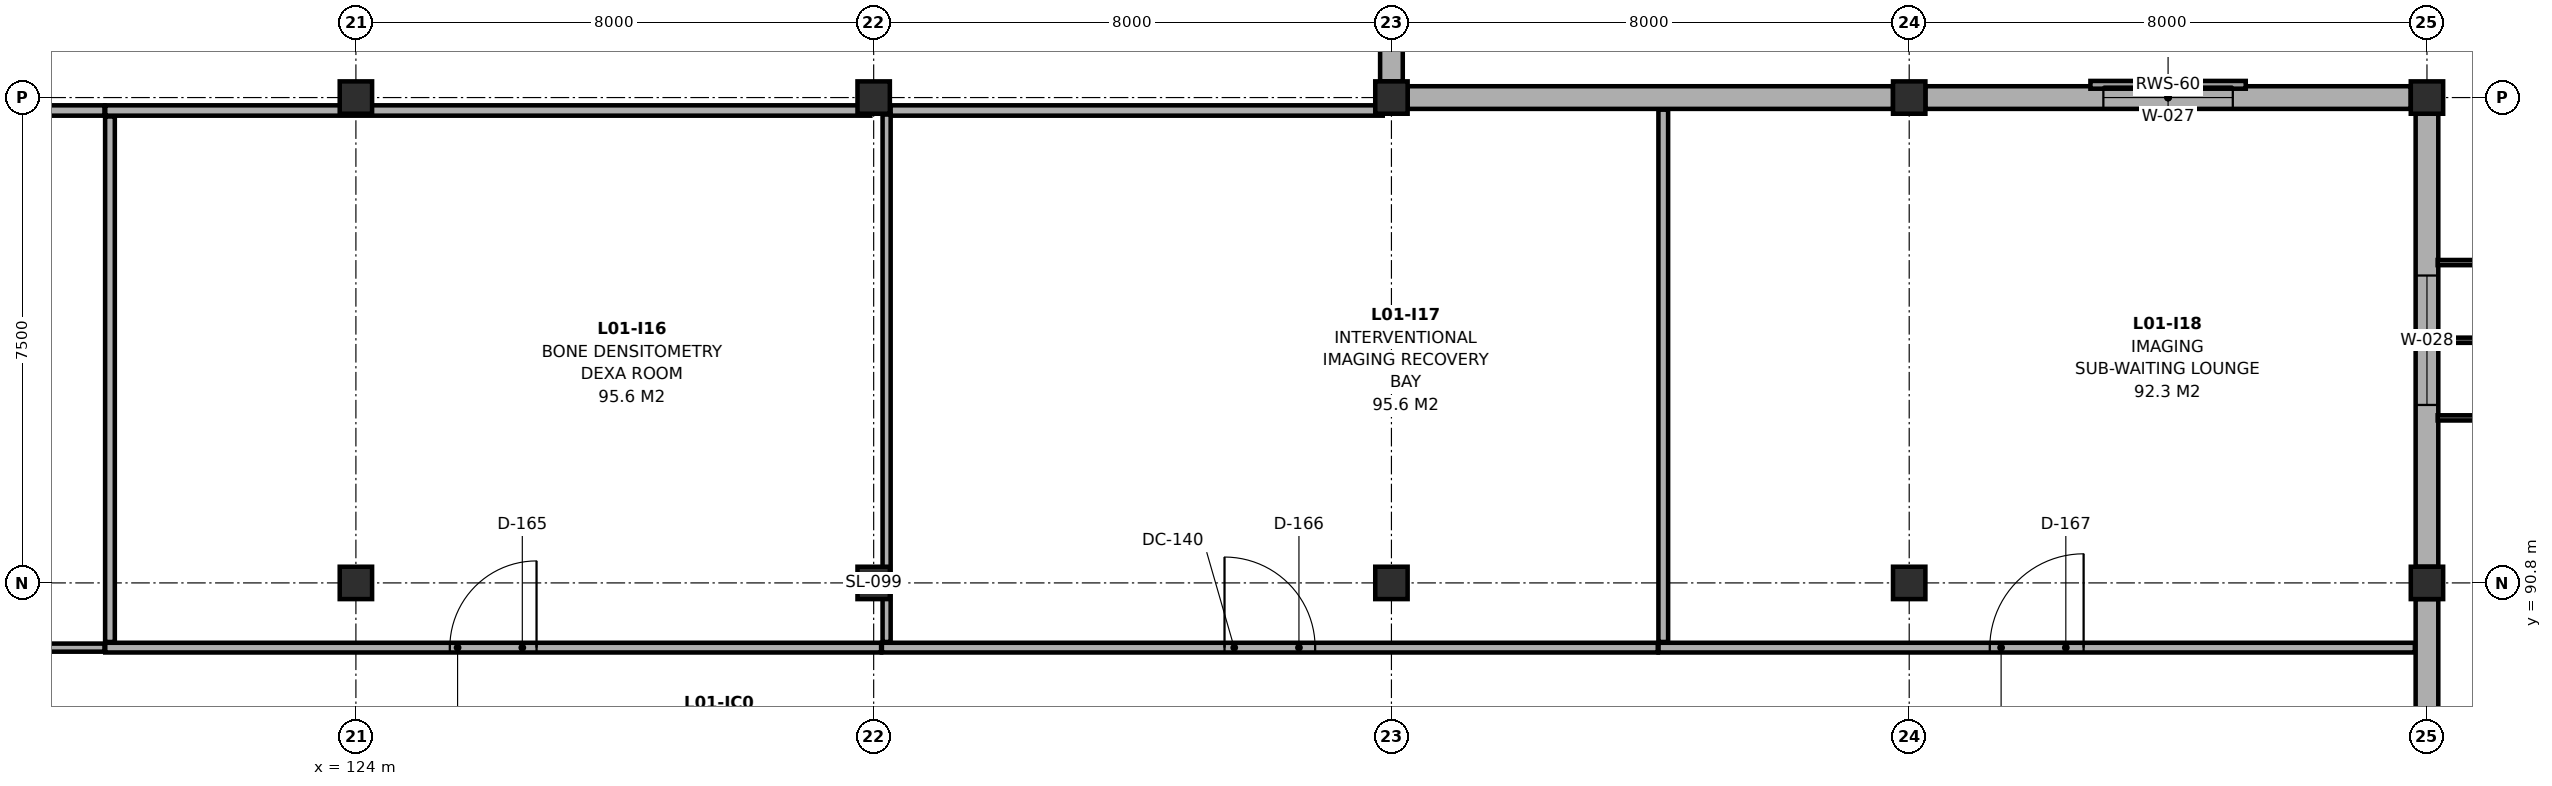
"""IFC4 building model, lengths in metres.
Left out: names, types, materials, properties, quantities, classifications, styles, units other than length and angle.
Written with IfcOpenShell. Run it as: python <this file> out.ifc"""

import sys

from ifc_helpers import new_model, si_unit, direction, frame, frame_2d, origin, origin_2d, place, context, subcontext, project, spatial, rectangle, extrude, element, fill, save


model = new_model("IFC4")
c1 = context("Model", 3, precision=1e-05, world=origin(), true_north=direction((0.0, 1.0)))
c2 = subcontext(c1, "Body", "Model", "MODEL_VIEW")
j1 = project(units=[si_unit("LENGTHUNIT", "METRE"), si_unit("PLANEANGLEUNIT", "RADIAN")], contexts=[c1])
p1 = place(None, origin())
s1 = spatial("IfcSite", under=j1, at=p1, CompositionType="ELEMENT")
p2 = place(p1, origin())
s2 = spatial("IfcBuilding", under=s1, at=p2, CompositionType="ELEMENT")
p3 = place(p2, frame((0.0, 0.0, 5.0)))
s3 = spatial("IfcBuildingStorey", under=s2, at=p3, CompositionType="ELEMENT", Elevation=5.0)
for number, where, z_axis, x_axis in (
    (1, (124.0, 90.8, 0.0), (0.0, 0.0, 1.0), (1.0, 0.0, 0.0)),
    (2, (124.0, 98.3, 0.0), (0.0, 0.0, 1.0), (1.0, 0.0, 0.0)),
    (3, (132.0, 90.8, 0.0), (0.0, 0.0, 1.0), (1.0, 0.0, 0.0)),
    (4, (132.0, 98.3, 0.0), (0.0, 0.0, 1.0), (1.0, 0.0, 0.0)),
    (5, (140.0, 90.8, 0.0), (0.0, 0.0, 1.0), (1.0, 0.0, 0.0)),
    (6, (140.0, 98.3, 0.0), (0.0, 0.0, 1.0), (1.0, 0.0, 0.0)),
    (7, (148.0, 90.8, 0.0), (0.0, 0.0, 1.0), (1.0, 0.0, 0.0)),
    (8, (148.0, 98.3, 0.0), (0.0, 0.0, 1.0), (1.0, 0.0, 0.0)),
    (9, (156.0, 90.8, 0.0), (0.0, 0.0, 1.0), (1.0, 0.0, 0.0)),
    (10, (156.0, 98.3, 0.0), (0.0, 0.0, 1.0), (1.0, 0.0, 0.0)),
):
    element("IfcColumn", number, at=place(p3, frame(where, z_axis=z_axis, x_axis=x_axis)), inside=s3, PredefinedType="COLUMN", context=c2, shape_type="SweptSolid", body=[
        extrude(rectangle(XDim=0.5, YDim=0.5, at=origin_2d()), origin(), (0.0, 0.0, 1.0), 5.5),
    ])
p4 = place(p3, frame((140.0, 105.55, 0.0), z_axis=(0.0, 0.0, 1.0), x_axis=(0.0, -1.0, 0.0)))
e11 = element("IfcWall", 11, at=p4, inside=s3, PredefinedType="SOLIDWALL", context=c2, shape_type="SweptSolid", body=[
    extrude(rectangle(XDim=7.0, YDim=0.35, at=frame_2d((3.5, 0.0))), origin(), (0.0, 0.0, 1.0), 3.655),
])
p5 = place(p4, frame((2.5, 0.0, 0.9)))
e12 = element("IfcOpeningElement", 12, at=p5, cuts=e11, PredefinedType="OPENING", context=c2, shape_type="SweptSolid", body=[
    extrude(rectangle(XDim=2.0, YDim=1.5, at=frame_2d((1.0, 0.75))), frame((0.0, 0.187, 0.0), z_axis=(0.0, -1.0, 0.0), x_axis=(1.0, 0.0, 0.0)), (0.0, 0.0, 1.0), 0.374),
])
p6 = place(p3, frame((140.25, 98.3, 0.0), z_axis=(0.0, 0.0, 1.0), x_axis=(1.0, 0.0, 0.0)))
e13 = element("IfcWall", 13, at=p6, inside=s3, PredefinedType="SOLIDWALL", context=c2, shape_type="SweptSolid", body=[
    extrude(rectangle(XDim=7.5, YDim=0.35, at=frame_2d((3.75, 0.0))), origin(), (0.0, 0.0, 1.0), 3.655),
])
p7 = place(p3, frame((148.25, 98.3, 0.0), z_axis=(0.0, 0.0, 1.0), x_axis=(1.0, 0.0, 0.0)))
e14 = element("IfcWall", 14, at=p7, inside=s3, PredefinedType="SOLIDWALL", context=c2, shape_type="SweptSolid", body=[
    extrude(rectangle(XDim=7.5, YDim=0.35, at=frame_2d((3.75, 0.0))), origin(), (0.0, 0.0, 1.0), 4.2),
])
p8 = place(p7, frame((2.75, 0.0, 0.9)))
e15 = element("IfcOpeningElement", 15, at=p8, cuts=e14, PredefinedType="OPENING", context=c2, shape_type="SweptSolid", body=[
    extrude(rectangle(XDim=2.0, YDim=1.7, at=frame_2d((1.0, 0.85))), frame((0.0, 0.187, 0.0), z_axis=(0.0, -1.0, 0.0), x_axis=(1.0, 0.0, 0.0)), (0.0, 0.0, 1.0), 0.374),
])
p9 = place(p3, frame((156.0, 98.05, 0.0), z_axis=(0.0, 0.0, 1.0), x_axis=(0.0, -1.0, 0.0)))
e16 = element("IfcWall", 16, at=p9, inside=s3, PredefinedType="SOLIDWALL", context=c2, shape_type="SweptSolid", body=[
    extrude(rectangle(XDim=7.0, YDim=0.35, at=frame_2d((3.5, 0.0))), origin(), (0.0, 0.0, 1.0), 4.2),
])
p10 = place(p9, frame((2.5, 0.0, 0.9)))
e17 = element("IfcOpeningElement", 17, at=p10, cuts=e16, PredefinedType="OPENING", context=c2, shape_type="SweptSolid", body=[
    extrude(rectangle(XDim=2.0, YDim=1.9, at=frame_2d((1.0, 0.95))), frame((0.0, 0.187, 0.0), z_axis=(0.0, -1.0, 0.0), x_axis=(1.0, 0.0, 0.0)), (0.0, 0.0, 1.0), 0.374),
])
p11 = place(p3, frame((156.0, 90.55, 0.0), z_axis=(0.0, 0.0, 1.0), x_axis=(0.0, -1.0, 0.0)))
e18 = element("IfcWall", 18, at=p11, inside=s3, PredefinedType="SOLIDWALL", context=c2, shape_type="SweptSolid", body=[
    extrude(rectangle(XDim=7.0, YDim=0.35, at=frame_2d((3.5, 0.0))), origin(), (0.0, 0.0, 1.0), 4.2),
])
p12 = place(p3, frame((108.187, 89.8, 0.0), z_axis=(0.0, 0.0, 1.0), x_axis=(1.0, 0.0, 0.0)))
e19 = element("IfcWall", 19, at=p12, inside=s3, PredefinedType="PARTITIONING", context=c2, shape_type="SweptSolid", body=[
    extrude(rectangle(XDim=11.928, YDim=0.125, at=frame_2d((5.964, 0.0))), origin(), (0.0, 0.0, 1.0), 4.2),
])
p13 = place(p12, frame((5.324, 0.0, 0.0)))
e20 = element("IfcOpeningElement", 20, at=p13, cuts=e19, PredefinedType="OPENING", context=c2, shape_type="SweptSolid", body=[
    extrude(rectangle(XDim=1.28, YDim=2.22, at=frame_2d((0.64, 1.11))), frame((0.0, 0.074, 0.0), z_axis=(0.0, -1.0, 0.0), x_axis=(1.0, 0.0, 0.0)), (0.0, 0.0, 1.0), 0.149),
])
p14 = place(p3, frame((120.127, 89.8, 0.0), z_axis=(0.0, 0.0, 1.0), x_axis=(1.0, 0.0, 0.0)))
e21 = element("IfcWall", 21, at=p14, inside=s3, PredefinedType="PARTITIONING", context=c2, shape_type="SweptSolid", body=[
    extrude(rectangle(XDim=11.988, YDim=0.15, at=frame_2d((5.994, 0.0))), origin(), (0.0, 0.0, 1.0), 4.2),
])
p15 = place(p14, frame((5.324, 0.0, 0.0)))
e22 = element("IfcOpeningElement", 22, at=p15, cuts=e21, PredefinedType="OPENING", context=c2, shape_type="SweptSolid", body=[
    extrude(rectangle(XDim=1.34, YDim=2.24, at=frame_2d((0.67, 1.12))), frame((0.0, 0.087, 0.0), z_axis=(0.0, -1.0, 0.0), x_axis=(1.0, 0.0, 0.0)), (0.0, 0.0, 1.0), 0.174),
])
p16 = place(p3, frame((132.127, 89.8, 0.0), z_axis=(0.0, 0.0, 1.0), x_axis=(1.0, 0.0, 0.0)))
e23 = element("IfcWall", 23, at=p16, inside=s3, PredefinedType="PARTITIONING", context=c2, shape_type="SweptSolid", body=[
    extrude(rectangle(XDim=11.988, YDim=0.15, at=frame_2d((5.994, 0.0))), origin(), (0.0, 0.0, 1.0), 4.2),
])
p17 = place(p16, frame((5.294, 0.0, 0.0)))
e24 = element("IfcOpeningElement", 24, at=p17, cuts=e23, PredefinedType="OPENING", context=c2, shape_type="SweptSolid", body=[
    extrude(rectangle(XDim=1.4, YDim=2.25, at=frame_2d((0.7, 1.125))), frame((0.0, 0.087, 0.0), z_axis=(0.0, -1.0, 0.0), x_axis=(1.0, 0.0, 0.0)), (0.0, 0.0, 1.0), 0.174),
])
p18 = place(p3, frame((144.127, 89.8, 0.0), z_axis=(0.0, 0.0, 1.0), x_axis=(1.0, 0.0, 0.0)))
e25 = element("IfcWall", 25, at=p18, inside=s3, PredefinedType="PARTITIONING", context=c2, shape_type="SweptSolid", body=[
    extrude(rectangle(XDim=11.686, YDim=0.15, at=frame_2d((5.843, 0.0))), origin(), (0.0, 0.0, 1.0), 4.2),
])
p19 = place(p18, frame((5.118, 0.0, 0.0)))
e26 = element("IfcOpeningElement", 26, at=p19, cuts=e25, PredefinedType="OPENING", context=c2, shape_type="SweptSolid", body=[
    extrude(rectangle(XDim=1.45, YDim=2.26, at=frame_2d((0.725, 1.13))), frame((0.0, 0.087, 0.0), z_axis=(0.0, -1.0, 0.0), x_axis=(1.0, 0.0, 0.0)), (0.0, 0.0, 1.0), 0.174),
])
p20 = place(p3, frame((108.262, 98.1, 0.0), z_axis=(0.0, 0.0, 1.0), x_axis=(1.0, 0.0, 0.0)))
e27 = element("IfcWall", 27, at=p20, inside=s3, PredefinedType="PARTITIONING", context=c2, shape_type="SweptSolid", body=[
    extrude(rectangle(XDim=11.853, YDim=0.16, at=frame_2d((5.927, 0.0))), origin(), (0.0, 0.0, 1.0), 4.2),
])
p21 = place(p3, frame((120.127, 98.1, 0.0), z_axis=(0.0, 0.0, 1.0), x_axis=(1.0, 0.0, 0.0)))
e28 = element("IfcWall", 28, at=p21, inside=s3, PredefinedType="PARTITIONING", context=c2, shape_type="SweptSolid", body=[
    extrude(rectangle(XDim=11.821, YDim=0.16, at=frame_2d((5.911, 0.0))), origin(), (0.0, 0.0, 1.0), 3.655),
])
p22 = place(p3, frame((132.262, 98.1, 0.0), z_axis=(0.0, 0.0, 1.0), x_axis=(1.0, 0.0, 0.0)))
e29 = element("IfcWall", 29, at=p22, inside=s3, PredefinedType="PARTITIONING", context=c2, shape_type="SweptSolid", body=[
    extrude(rectangle(XDim=7.604, YDim=0.16, at=frame_2d((3.802, 0.0))), origin(), (0.0, 0.0, 1.0), 3.655),
])
p23 = place(p3, frame((120.2, 89.887, 0.0), z_axis=(0.0, 0.0, 1.0), x_axis=(0.0, 1.0, 0.0)))
e30 = element("IfcWall", 30, at=p23, inside=s3, PredefinedType="PARTITIONING", context=c2, shape_type="SweptSolid", body=[
    extrude(rectangle(XDim=8.121, YDim=0.15, at=frame_2d((4.061, 0.0))), origin(), (0.0, 0.0, 1.0), 4.2),
])
p24 = place(p3, frame((132.2, 89.887, 0.0), z_axis=(0.0, 0.0, 1.0), x_axis=(0.0, 1.0, 0.0)))
e31 = element("IfcWall", 31, at=p24, inside=s3, PredefinedType="PARTITIONING", context=c2, shape_type="SweptSolid", body=[
    extrude(rectangle(XDim=8.151, YDim=0.125, at=frame_2d((4.076, 0.0))), origin(), (0.0, 0.0, 1.0), 3.655),
])
p25 = place(p3, frame((144.2, 89.887, 0.0), z_axis=(0.0, 0.0, 1.0), x_axis=(0.0, 1.0, 0.0)))
e32 = element("IfcWall", 32, at=p25, inside=s3, PredefinedType="PARTITIONING", context=c2, shape_type="SweptSolid", body=[
    extrude(rectangle(XDim=8.226, YDim=0.15, at=frame_2d((4.113, 0.0))), origin(), (0.0, 0.0, 1.0), 4.2),
])
p26 = place(p8, origin())
e33 = element("IfcWindow", 33, at=p26, inside=s3, PartitioningType="DOUBLE_PANEL_VERTICAL", PredefinedType="WINDOW", context=c2, shape_type="SweptSolid", body=[
    extrude(rectangle(XDim=2.0, YDim=1.7, at=frame_2d((1.0, 0.85))), frame((0.0, 0.03, 0.0), z_axis=(0.0, -1.0, 0.0), x_axis=(1.0, 0.0, 0.0)), (0.0, 0.0, 1.0), 0.06),
])
fill(e15, e33)
p27 = place(p10, origin())
e34 = element("IfcWindow", 34, at=p27, inside=s3, PartitioningType="DOUBLE_PANEL_VERTICAL", PredefinedType="WINDOW", context=c2, shape_type="SweptSolid", body=[
    extrude(rectangle(XDim=2.0, YDim=1.9, at=frame_2d((1.0, 0.95))), frame((0.0, 0.03, 0.0), z_axis=(0.0, -1.0, 0.0), x_axis=(1.0, 0.0, 0.0)), (0.0, 0.0, 1.0), 0.06),
])
fill(e17, e34)
p28 = place(p15, origin())
e35 = element("IfcDoor", 35, at=p28, inside=s3, OperationType="SINGLE_SWING_RIGHT", PredefinedType="DOOR", context=c2, shape_type="SweptSolid", body=[
    extrude(rectangle(XDim=1.34, YDim=2.24, at=frame_2d((0.67, 1.12))), frame((0.0, 0.025, 0.0), z_axis=(0.0, -1.0, 0.0), x_axis=(1.0, 0.0, 0.0)), (0.0, 0.0, 1.0), 0.05),
])
fill(e22, e35)
p29 = place(p17, origin())
e36 = element("IfcDoor", 36, at=p29, inside=s3, OperationType="SINGLE_SWING_LEFT", PredefinedType="DOOR", context=c2, shape_type="SweptSolid", body=[
    extrude(rectangle(XDim=1.4, YDim=2.25, at=frame_2d((0.7, 1.125))), frame((0.0, 0.025, 0.0), z_axis=(0.0, -1.0, 0.0), x_axis=(1.0, 0.0, 0.0)), (0.0, 0.0, 1.0), 0.05),
])
fill(e24, e36)
p30 = place(p19, origin())
e37 = element("IfcDoor", 37, at=p30, inside=s3, OperationType="SINGLE_SWING_RIGHT", PredefinedType="DOOR", context=c2, shape_type="SweptSolid", body=[
    extrude(rectangle(XDim=1.45, YDim=2.26, at=frame_2d((0.725, 1.13))), frame((0.0, 0.025, 0.0), z_axis=(0.0, -1.0, 0.0), x_axis=(1.0, 0.0, 0.0)), (0.0, 0.0, 1.0), 0.05),
])
fill(e26, e37)
save(model, sys.argv[1])
